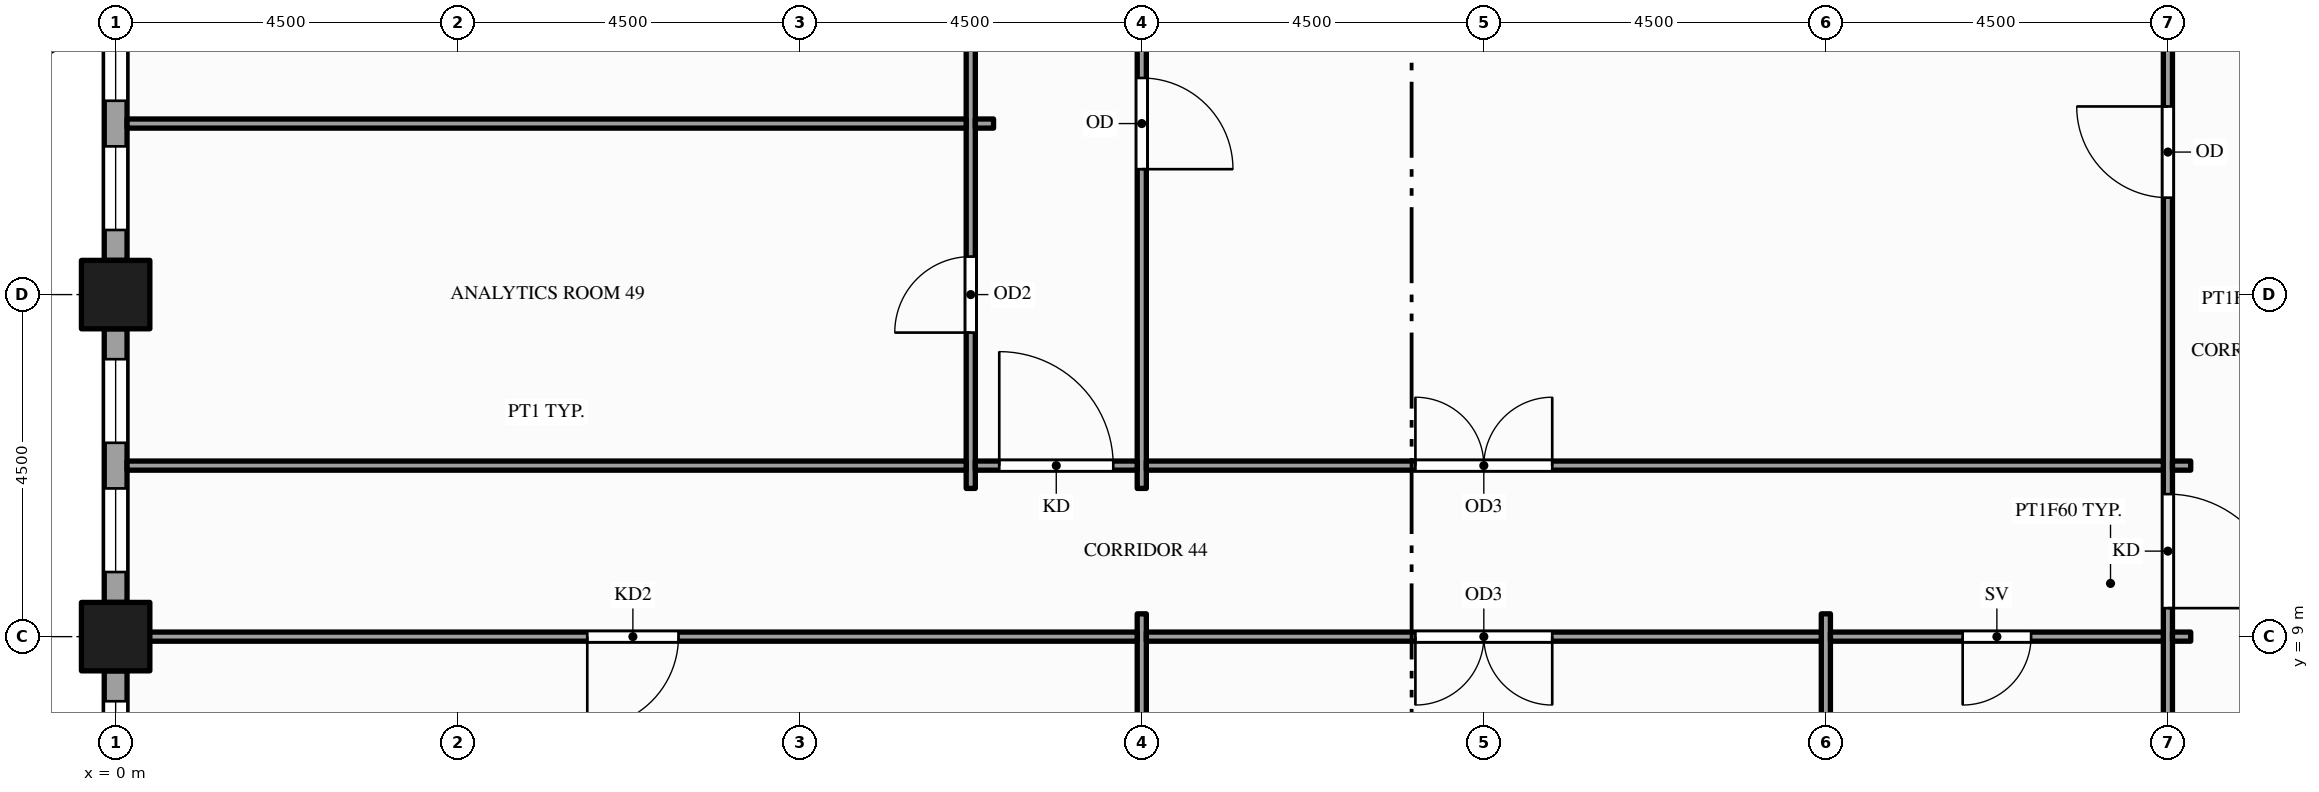
"""IFC4 building model, lengths in metres.
Left out: names, types, materials, properties, quantities, classifications, styles, units other than length and angle.
Written with IfcOpenShell. Run it as: python <this file> out.ifc"""

import sys

from ifc_helpers import new_model, si_unit, direction, frame, frame_2d, origin, origin_2d, place, context, subcontext, project, spatial, rectangle, hollow_rectangle, extrude, element, fill, save


model = new_model("IFC4")
c1 = context("Model", 3, precision=1e-05, world=origin(), true_north=direction((0.0, 1.0)))
c2 = subcontext(c1, "Body", "Model", "MODEL_VIEW")
j1 = project(units=[si_unit("LENGTHUNIT", "METRE"), si_unit("PLANEANGLEUNIT", "RADIAN")], contexts=[c1])
p1 = place(None, origin())
s1 = spatial("IfcSite", under=j1, at=p1, CompositionType="ELEMENT")
p2 = place(p1, origin())
s2 = spatial("IfcBuilding", under=s1, at=p2, CompositionType="ELEMENT")
p3 = place(p2, frame((0.0, 0.0, 179.0)))
s3 = spatial("IfcBuildingStorey", under=s2, at=p3, CompositionType="ELEMENT", Elevation=179.0)
for number, where, z_axis, x_axis in (
    (1, (0.0, 9.0, -0.15), (0.0, 0.0, 1.0), (1.0, 0.0, 0.0)),
    (2, (0.0, 13.5, -0.15), (0.0, 0.0, 1.0), (1.0, 0.0, 0.0)),
):
    element("IfcColumn", number, at=place(p3, frame(where, z_axis=z_axis, x_axis=x_axis)), inside=s3, PredefinedType="COLUMN", context=c2, shape_type="SweptSolid", body=[
        extrude(hollow_rectangle(XDim=0.9, YDim=0.9, WallThickness=0.045, at=origin_2d()), origin(), (0.0, 0.0, 1.0), 4.0),
    ])
p4 = place(p3, frame((0.0, 17.55, 0.0), z_axis=(0.0, 0.0, 1.0), x_axis=(0.0, -1.0, 0.0)))
e3 = element("IfcWall", 3, at=p4, inside=s3, PredefinedType="STANDARD", context=c2, shape_type="SweptSolid", body=[
    extrude(rectangle(XDim=3.6, YDim=0.3, at=frame_2d((1.8, 0.0))), origin(), (0.0, 0.0, 1.0), 3.149),
])
p5 = place(p4, frame((0.4, 0.0, 0.9)))
e4 = element("IfcOpeningElement", 4, at=p5, cuts=e3, PredefinedType="OPENING", context=c2, shape_type="SweptSolid", body=[
    extrude(rectangle(XDim=1.1, YDim=2.0, at=frame_2d((0.55, 1.0))), frame((0.0, 0.16, 0.0), z_axis=(0.0, -1.0, 0.0), x_axis=(1.0, 0.0, 0.0)), (0.0, 0.0, 1.0), 0.32),
])
p6 = place(p4, frame((2.1, 0.0, 0.9)))
e5 = element("IfcOpeningElement", 5, at=p6, cuts=e3, PredefinedType="OPENING", context=c2, shape_type="SweptSolid", body=[
    extrude(rectangle(XDim=1.1, YDim=2.0, at=frame_2d((0.55, 1.0))), frame((0.0, 0.16, 0.0), z_axis=(0.0, -1.0, 0.0), x_axis=(1.0, 0.0, 0.0)), (0.0, 0.0, 1.0), 0.32),
])
p7 = place(p3, frame((0.0, 13.05, 0.0), z_axis=(0.0, 0.0, 1.0), x_axis=(0.0, -1.0, 0.0)))
e6 = element("IfcWall", 6, at=p7, inside=s3, PredefinedType="STANDARD", context=c2, shape_type="SweptSolid", body=[
    extrude(rectangle(XDim=3.6, YDim=0.3, at=frame_2d((1.8, 0.0))), origin(), (0.0, 0.0, 1.0), 3.149),
])
p8 = place(p7, frame((0.4, 0.0, 0.9)))
e7 = element("IfcOpeningElement", 7, at=p8, cuts=e6, PredefinedType="OPENING", context=c2, shape_type="SweptSolid", body=[
    extrude(rectangle(XDim=1.1, YDim=2.0, at=frame_2d((0.55, 1.0))), frame((0.0, 0.16, 0.0), z_axis=(0.0, -1.0, 0.0), x_axis=(1.0, 0.0, 0.0)), (0.0, 0.0, 1.0), 0.32),
])
p9 = place(p7, frame((2.1, 0.0, 0.9)))
e8 = element("IfcOpeningElement", 8, at=p9, cuts=e6, PredefinedType="OPENING", context=c2, shape_type="SweptSolid", body=[
    extrude(rectangle(XDim=1.1, YDim=2.0, at=frame_2d((0.55, 1.0))), frame((0.0, 0.16, 0.0), z_axis=(0.0, -1.0, 0.0), x_axis=(1.0, 0.0, 0.0)), (0.0, 0.0, 1.0), 0.32),
])
p10 = place(p3, frame((0.0, 8.55, 0.0), z_axis=(0.0, 0.0, 1.0), x_axis=(0.0, -1.0, 0.0)))
e9 = element("IfcWall", 9, at=p10, inside=s3, PredefinedType="STANDARD", context=c2, shape_type="SweptSolid", body=[
    extrude(rectangle(XDim=3.6, YDim=0.3, at=frame_2d((1.8, 0.0))), origin(), (0.0, 0.0, 1.0), 3.149),
])
p11 = place(p10, frame((0.4, 0.0, 0.9)))
e10 = element("IfcOpeningElement", 10, at=p11, cuts=e9, PredefinedType="OPENING", context=c2, shape_type="SweptSolid", body=[
    extrude(rectangle(XDim=1.1, YDim=2.0, at=frame_2d((0.55, 1.0))), frame((0.0, 0.16, 0.0), z_axis=(0.0, -1.0, 0.0), x_axis=(1.0, 0.0, 0.0)), (0.0, 0.0, 1.0), 0.32),
])
p12 = place(p10, frame((2.1, 0.0, 0.9)))
e11 = element("IfcOpeningElement", 11, at=p12, cuts=e9, PredefinedType="OPENING", context=c2, shape_type="SweptSolid", body=[
    extrude(rectangle(XDim=1.1, YDim=2.0, at=frame_2d((0.55, 1.0))), frame((0.0, 0.16, 0.0), z_axis=(0.0, -1.0, 0.0), x_axis=(1.0, 0.0, 0.0)), (0.0, 0.0, 1.0), 0.32),
])
p13 = place(p3, frame((11.25, 10.95, 0.0), z_axis=(0.0, 0.0, 1.0), x_axis=(0.0, 1.0, 0.0)))
e12 = element("IfcWall", 12, at=p13, inside=s3, PredefinedType="PARTITIONING", context=c2, shape_type="SweptSolid", body=[
    extrude(rectangle(XDim=20.85, YDim=0.12, at=frame_2d((10.425, 0.0))), origin(), (0.0, 0.0, 1.0), 2.6),
])
p14 = place(p13, frame((2.05, 0.0, 0.0)))
e13 = element("IfcOpeningElement", 13, at=p14, cuts=e12, PredefinedType="OPENING", context=c2, shape_type="SweptSolid", body=[
    extrude(rectangle(XDim=1.0, YDim=2.1, at=frame_2d((0.5, 1.05))), frame((0.0, 0.07, 0.0), z_axis=(0.0, -1.0, 0.0), x_axis=(1.0, 0.0, 0.0)), (0.0, 0.0, 1.0), 0.14),
])
p15 = place(p13, frame((6.55, 0.0, 0.0)))
e14 = element("IfcOpeningElement", 14, at=p15, cuts=e12, PredefinedType="OPENING", context=c2, shape_type="SweptSolid", body=[
    extrude(rectangle(XDim=1.0, YDim=2.1, at=frame_2d((0.5, 1.05))), frame((0.0, 0.07, 0.0), z_axis=(0.0, -1.0, 0.0), x_axis=(1.0, 0.0, 0.0)), (0.0, 0.0, 1.0), 0.14),
])
p16 = place(p13, frame((12.205, 0.0, 0.0)))
e15 = element("IfcOpeningElement", 15, at=p16, cuts=e12, PredefinedType="OPENING", context=c2, shape_type="SweptSolid", body=[
    extrude(rectangle(XDim=1.0, YDim=2.1, at=frame_2d((0.5, 1.05))), frame((0.0, 0.07, 0.0), z_axis=(0.0, -1.0, 0.0), x_axis=(1.0, 0.0, 0.0)), (0.0, 0.0, 1.0), 0.14),
])
p17 = place(p3, frame((13.5, 0.15, 0.0), z_axis=(0.0, 0.0, 1.0), x_axis=(0.0, 1.0, 0.0)))
e16 = element("IfcWall", 16, at=p17, inside=s3, PredefinedType="PARTITIONING", context=c2, shape_type="SweptSolid", body=[
    extrude(rectangle(XDim=9.15, YDim=0.12, at=frame_2d((4.575, 0.0))), origin(), (0.0, 0.0, 1.0), 2.87),
])
p18 = place(p3, frame((13.5, 10.95, 0.0), z_axis=(0.0, 0.0, 1.0), x_axis=(0.0, 1.0, 0.0)))
e17 = element("IfcWall", 17, at=p18, inside=s3, PredefinedType="PARTITIONING", context=c2, shape_type="SweptSolid", body=[
    extrude(rectangle(XDim=20.85, YDim=0.12, at=frame_2d((10.425, 0.0))), origin(), (0.0, 0.0, 1.0), 2.6),
])
p19 = place(p18, frame((4.2, 0.0, 0.0)))
e18 = element("IfcOpeningElement", 18, at=p19, cuts=e17, PredefinedType="OPENING", context=c2, shape_type="SweptSolid", body=[
    extrude(rectangle(XDim=1.2, YDim=2.1, at=frame_2d((0.6, 1.05))), frame((0.0, 0.07, 0.0), z_axis=(0.0, -1.0, 0.0), x_axis=(1.0, 0.0, 0.0)), (0.0, 0.0, 1.0), 0.14),
])
p20 = place(p3, frame((22.5, 1.65, 0.0), z_axis=(0.0, 0.0, 1.0), x_axis=(0.0, 1.0, 0.0)))
e19 = element("IfcWall", 19, at=p20, inside=s3, PredefinedType="PARTITIONING", context=c2, shape_type="SweptSolid", body=[
    extrude(rectangle(XDim=7.65, YDim=0.12, at=frame_2d((3.825, 0.0))), origin(), (0.0, 0.0, 1.0), 2.87),
])
p21 = place(p3, frame((27.0, 1.65, 0.0), z_axis=(0.0, 0.0, 1.0), x_axis=(0.0, 1.0, 0.0)))
e20 = element("IfcWall", 20, at=p21, inside=s3, PredefinedType="PARTITIONING", context=c2, shape_type="SweptSolid", body=[
    extrude(rectangle(XDim=22.2, YDim=0.12, at=frame_2d((11.1, 0.0))), origin(), (0.0, 0.0, 1.0), 2.87),
])
p22 = place(p21, frame((7.725, 0.0, 0.0)))
e21 = element("IfcOpeningElement", 21, at=p22, cuts=e20, PredefinedType="OPENING", context=c2, shape_type="SweptSolid", body=[
    extrude(rectangle(XDim=1.5, YDim=2.1, at=frame_2d((0.75, 1.05))), frame((0.0, 0.07, 0.0), z_axis=(0.0, -1.0, 0.0), x_axis=(1.0, 0.0, 0.0)), (0.0, 0.0, 1.0), 0.14),
])
p23 = place(p21, frame((13.125, 0.0, 0.0)))
e22 = element("IfcOpeningElement", 22, at=p23, cuts=e20, PredefinedType="OPENING", context=c2, shape_type="SweptSolid", body=[
    extrude(rectangle(XDim=1.2, YDim=2.1, at=frame_2d((0.6, 1.05))), frame((0.0, 0.07, 0.0), z_axis=(0.0, -1.0, 0.0), x_axis=(1.0, 0.0, 0.0)), (0.0, 0.0, 1.0), 0.14),
])
p24 = place(p3, frame((0.15, 9.0, 0.0), z_axis=(0.0, 0.0, 1.0), x_axis=(1.0, 0.0, 0.0)))
e23 = element("IfcWall", 23, at=p24, inside=s3, PredefinedType="PARTITIONING", context=c2, shape_type="SweptSolid", body=[
    extrude(rectangle(XDim=13.29, YDim=0.12, at=frame_2d((6.645, 0.0))), origin(), (0.0, 0.0, 1.0), 2.87),
])
p25 = place(p24, frame((6.055, 0.0, 0.0)))
e24 = element("IfcOpeningElement", 24, at=p25, cuts=e23, PredefinedType="OPENING", context=c2, shape_type="SweptSolid", body=[
    extrude(rectangle(XDim=1.2, YDim=2.1, at=frame_2d((0.6, 1.05))), frame((0.0, 0.07, 0.0), z_axis=(0.0, -1.0, 0.0), x_axis=(1.0, 0.0, 0.0)), (0.0, 0.0, 1.0), 0.14),
])
p26 = place(p3, frame((13.56, 9.0, 0.0), z_axis=(0.0, 0.0, 1.0), x_axis=(1.0, 0.0, 0.0)))
e25 = element("IfcWall", 25, at=p26, inside=s3, PredefinedType="PARTITIONING", context=c2, shape_type="SweptSolid", body=[
    extrude(rectangle(XDim=8.88, YDim=0.12, at=frame_2d((4.44, 0.0))), origin(), (0.0, 0.0, 1.0), 2.87),
])
p27 = place(p26, frame((3.54, 0.0, 0.0)))
e26 = element("IfcOpeningElement", 26, at=p27, cuts=e25, PredefinedType="OPENING", context=c2, shape_type="SweptSolid", body=[
    extrude(rectangle(XDim=1.8, YDim=2.1, at=frame_2d((0.9, 1.05))), frame((0.0, 0.07, 0.0), z_axis=(0.0, -1.0, 0.0), x_axis=(1.0, 0.0, 0.0)), (0.0, 0.0, 1.0), 0.14),
])
p28 = place(p3, frame((22.56, 9.0, 0.0), z_axis=(0.0, 0.0, 1.0), x_axis=(1.0, 0.0, 0.0)))
e27 = element("IfcWall", 27, at=p28, inside=s3, PredefinedType="PARTITIONING", context=c2, shape_type="SweptSolid", body=[
    extrude(rectangle(XDim=4.38, YDim=0.12, at=frame_2d((2.19, 0.0))), origin(), (0.0, 0.0, 1.0), 2.87),
])
p29 = place(p28, frame((1.74, 0.0, 0.0)))
e28 = element("IfcOpeningElement", 28, at=p29, cuts=e27, PredefinedType="OPENING", context=c2, shape_type="SweptSolid", body=[
    extrude(rectangle(XDim=0.9, YDim=2.1, at=frame_2d((0.45, 1.05))), frame((0.0, 0.07, 0.0), z_axis=(0.0, -1.0, 0.0), x_axis=(1.0, 0.0, 0.0)), (0.0, 0.0, 1.0), 0.14),
])
p30 = place(p3, frame((27.06, 9.0, 0.0), z_axis=(0.0, 0.0, 1.0), x_axis=(1.0, 0.0, 0.0)))
e29 = element("IfcWall", 29, at=p30, inside=s3, PredefinedType="PARTITIONING", context=c2, shape_type="SweptSolid", body=[
    extrude(rectangle(XDim=0.24, YDim=0.12, at=frame_2d((0.12, 0.0))), origin(), (0.0, 0.0, 1.0), 2.87),
])
p31 = place(p3, frame((0.15, 11.25, 0.0), z_axis=(0.0, 0.0, 1.0), x_axis=(1.0, 0.0, 0.0)))
e30 = element("IfcWall", 30, at=p31, inside=s3, PredefinedType="PARTITIONING", context=c2, shape_type="SweptSolid", body=[
    extrude(rectangle(XDim=11.04, YDim=0.12, at=frame_2d((5.52, 0.0))), origin(), (0.0, 0.0, 1.0), 2.87),
])
p32 = place(p3, frame((11.31, 11.25, 0.0), z_axis=(0.0, 0.0, 1.0), x_axis=(1.0, 0.0, 0.0)))
e31 = element("IfcWall", 31, at=p32, inside=s3, PredefinedType="PARTITIONING", context=c2, shape_type="SweptSolid", body=[
    extrude(rectangle(XDim=2.13, YDim=0.12, at=frame_2d((1.065, 0.0))), origin(), (0.0, 0.0, 1.0), 2.87),
])
p33 = place(p32, frame((0.315, 0.0, 0.0)))
e32 = element("IfcOpeningElement", 32, at=p33, cuts=e31, PredefinedType="OPENING", context=c2, shape_type="SweptSolid", body=[
    extrude(rectangle(XDim=1.5, YDim=2.1, at=frame_2d((0.75, 1.05))), frame((0.0, 0.07, 0.0), z_axis=(0.0, -1.0, 0.0), x_axis=(1.0, 0.0, 0.0)), (0.0, 0.0, 1.0), 0.14),
])
p34 = place(p3, frame((13.56, 11.25, 0.0), z_axis=(0.0, 0.0, 1.0), x_axis=(1.0, 0.0, 0.0)))
e33 = element("IfcWall", 33, at=p34, inside=s3, PredefinedType="PARTITIONING", context=c2, shape_type="SweptSolid", body=[
    extrude(rectangle(XDim=13.38, YDim=0.12, at=frame_2d((6.69, 0.0))), origin(), (0.0, 0.0, 1.0), 2.87),
])
p35 = place(p34, frame((3.54, 0.0, 0.0)))
e34 = element("IfcOpeningElement", 34, at=p35, cuts=e33, PredefinedType="OPENING", context=c2, shape_type="SweptSolid", body=[
    extrude(rectangle(XDim=1.8, YDim=2.1, at=frame_2d((0.9, 1.05))), frame((0.0, 0.07, 0.0), z_axis=(0.0, -1.0, 0.0), x_axis=(1.0, 0.0, 0.0)), (0.0, 0.0, 1.0), 0.14),
])
p36 = place(p3, frame((27.06, 11.25, 0.0), z_axis=(0.0, 0.0, 1.0), x_axis=(1.0, 0.0, 0.0)))
e35 = element("IfcWall", 35, at=p36, inside=s3, PredefinedType="PARTITIONING", context=c2, shape_type="SweptSolid", body=[
    extrude(rectangle(XDim=0.24, YDim=0.12, at=frame_2d((0.12, 0.0))), origin(), (0.0, 0.0, 1.0), 2.87),
])
p37 = place(p3, frame((0.15, 15.75, 0.0), z_axis=(0.0, 0.0, 1.0), x_axis=(1.0, 0.0, 0.0)))
e36 = element("IfcWall", 36, at=p37, inside=s3, PredefinedType="PARTITIONING", context=c2, shape_type="SweptSolid", body=[
    extrude(rectangle(XDim=11.04, YDim=0.12, at=frame_2d((5.52, 0.0))), origin(), (0.0, 0.0, 1.0), 2.87),
])
p38 = place(p3, frame((11.31, 15.75, 0.0), z_axis=(0.0, 0.0, 1.0), x_axis=(1.0, 0.0, 0.0)))
e37 = element("IfcWall", 37, at=p38, inside=s3, PredefinedType="PARTITIONING", context=c2, shape_type="SweptSolid", body=[
    extrude(rectangle(XDim=0.24, YDim=0.12, at=frame_2d((0.12, 0.0))), origin(), (0.0, 0.0, 1.0), 2.87),
])
p39 = place(p5, origin())
e38 = element("IfcWindow", 38, at=p39, inside=s3, PartitioningType="SINGLE_PANEL", PredefinedType="WINDOW", context=c2, shape_type="SweptSolid", body=[
    extrude(rectangle(XDim=1.1, YDim=2.0, at=frame_2d((0.55, 1.0))), frame((0.0, 0.03, 0.0), z_axis=(0.0, -1.0, 0.0), x_axis=(1.0, 0.0, 0.0)), (0.0, 0.0, 1.0), 0.06),
])
fill(e4, e38)
p40 = place(p6, origin())
e39 = element("IfcWindow", 39, at=p40, inside=s3, PartitioningType="SINGLE_PANEL", PredefinedType="WINDOW", context=c2, shape_type="SweptSolid", body=[
    extrude(rectangle(XDim=1.1, YDim=2.0, at=frame_2d((0.55, 1.0))), frame((0.0, 0.03, 0.0), z_axis=(0.0, -1.0, 0.0), x_axis=(1.0, 0.0, 0.0)), (0.0, 0.0, 1.0), 0.06),
])
fill(e5, e39)
p41 = place(p8, origin())
e40 = element("IfcWindow", 40, at=p41, inside=s3, PartitioningType="SINGLE_PANEL", PredefinedType="WINDOW", context=c2, shape_type="SweptSolid", body=[
    extrude(rectangle(XDim=1.1, YDim=2.0, at=frame_2d((0.55, 1.0))), frame((0.0, 0.03, 0.0), z_axis=(0.0, -1.0, 0.0), x_axis=(1.0, 0.0, 0.0)), (0.0, 0.0, 1.0), 0.06),
])
fill(e7, e40)
p42 = place(p9, origin())
e41 = element("IfcWindow", 41, at=p42, inside=s3, PartitioningType="SINGLE_PANEL", PredefinedType="WINDOW", context=c2, shape_type="SweptSolid", body=[
    extrude(rectangle(XDim=1.1, YDim=2.0, at=frame_2d((0.55, 1.0))), frame((0.0, 0.03, 0.0), z_axis=(0.0, -1.0, 0.0), x_axis=(1.0, 0.0, 0.0)), (0.0, 0.0, 1.0), 0.06),
])
fill(e8, e41)
p43 = place(p11, origin())
e42 = element("IfcWindow", 42, at=p43, inside=s3, PartitioningType="SINGLE_PANEL", PredefinedType="WINDOW", context=c2, shape_type="SweptSolid", body=[
    extrude(rectangle(XDim=1.1, YDim=2.0, at=frame_2d((0.55, 1.0))), frame((0.0, 0.03, 0.0), z_axis=(0.0, -1.0, 0.0), x_axis=(1.0, 0.0, 0.0)), (0.0, 0.0, 1.0), 0.06),
])
fill(e10, e42)
p44 = place(p22, origin())
e43 = element("IfcDoor", 43, at=p44, inside=s3, OperationType="SINGLE_SWING_LEFT", PredefinedType="DOOR", context=c2, shape_type="SweptSolid", body=[
    extrude(rectangle(XDim=1.5, YDim=2.1, at=frame_2d((0.75, 1.05))), frame((0.0, 0.025, 0.0), z_axis=(0.0, -1.0, 0.0), x_axis=(1.0, 0.0, 0.0)), (0.0, 0.0, 1.0), 0.05),
])
fill(e21, e43)
p45 = place(p25, origin())
e44 = element("IfcDoor", 44, at=p45, inside=s3, OperationType="SINGLE_SWING_LEFT", PredefinedType="DOOR", context=c2, shape_type="SweptSolid", body=[
    extrude(rectangle(XDim=1.2, YDim=2.1, at=frame_2d((0.6, 1.05))), frame((0.0, 0.025, 0.0), z_axis=(0.0, -1.0, 0.0), x_axis=(1.0, 0.0, 0.0)), (0.0, 0.0, 1.0), 0.05),
])
fill(e24, e44)
p46 = place(p27, origin())
e45 = element("IfcDoor", 45, at=p46, inside=s3, OperationType="DOUBLE_DOOR_SINGLE_SWING", PredefinedType="DOOR", context=c2, shape_type="SweptSolid", body=[
    extrude(rectangle(XDim=1.8, YDim=2.1, at=frame_2d((0.9, 1.05))), frame((0.0, 0.025, 0.0), z_axis=(0.0, -1.0, 0.0), x_axis=(1.0, 0.0, 0.0)), (0.0, 0.0, 1.0), 0.05),
])
fill(e26, e45)
p47 = place(p29, origin())
e46 = element("IfcDoor", 46, at=p47, inside=s3, OperationType="SINGLE_SWING_LEFT", PredefinedType="DOOR", context=c2, shape_type="SweptSolid", body=[
    extrude(rectangle(XDim=0.9, YDim=2.1, at=frame_2d((0.45, 1.05))), frame((0.0, 0.025, 0.0), z_axis=(0.0, -1.0, 0.0), x_axis=(1.0, 0.0, 0.0)), (0.0, 0.0, 1.0), 0.05),
])
fill(e28, e46)
p48 = place(p35, origin())
e47 = element("IfcDoor", 47, at=p48, inside=s3, OperationType="DOUBLE_DOOR_SINGLE_SWING", PredefinedType="DOOR", context=c2, shape_type="SweptSolid", body=[
    extrude(rectangle(XDim=1.8, YDim=2.1, at=frame_2d((0.9, 1.05))), frame((0.0, 0.025, 0.0), z_axis=(0.0, -1.0, 0.0), x_axis=(1.0, 0.0, 0.0)), (0.0, 0.0, 1.0), 0.05),
])
fill(e34, e47)
p49 = place(p33, origin())
e48 = element("IfcDoor", 48, at=p49, inside=s3, OperationType="SINGLE_SWING_LEFT", PredefinedType="DOOR", context=c2, shape_type="SweptSolid", body=[
    extrude(rectangle(XDim=1.5, YDim=2.1, at=frame_2d((0.75, 1.05))), frame((0.0, 0.025, 0.0), z_axis=(0.0, -1.0, 0.0), x_axis=(1.0, 0.0, 0.0)), (0.0, 0.0, 1.0), 0.05),
])
fill(e32, e48)
p50 = place(p14, origin())
e49 = element("IfcDoor", 49, at=p50, inside=s3, OperationType="SINGLE_SWING_LEFT", PredefinedType="DOOR", context=c2, shape_type="SweptSolid", body=[
    extrude(rectangle(XDim=1.0, YDim=2.1, at=frame_2d((0.5, 1.05))), frame((0.0, 0.025, 0.0), z_axis=(0.0, -1.0, 0.0), x_axis=(1.0, 0.0, 0.0)), (0.0, 0.0, 1.0), 0.05),
])
fill(e13, e49)
p51 = place(p19, origin())
e50 = element("IfcDoor", 50, at=p51, inside=s3, OperationType="SINGLE_SWING_LEFT", PredefinedType="DOOR", context=c2, shape_type="SweptSolid", body=[
    extrude(rectangle(XDim=1.2, YDim=2.1, at=frame_2d((0.6, 1.05))), frame((0.0, 0.025, 0.0), z_axis=(0.0, -1.0, 0.0), x_axis=(1.0, 0.0, 0.0)), (0.0, 0.0, 1.0), 0.05),
])
fill(e18, e50)
p52 = place(p23, origin())
e51 = element("IfcDoor", 51, at=p52, inside=s3, OperationType="SINGLE_SWING_RIGHT", PredefinedType="DOOR", context=c2, shape_type="SweptSolid", body=[
    extrude(rectangle(XDim=1.2, YDim=2.1, at=frame_2d((0.6, 1.05))), frame((0.0, 0.025, 0.0), z_axis=(0.0, -1.0, 0.0), x_axis=(1.0, 0.0, 0.0)), (0.0, 0.0, 1.0), 0.05),
])
fill(e22, e51)
save(model, sys.argv[1])
